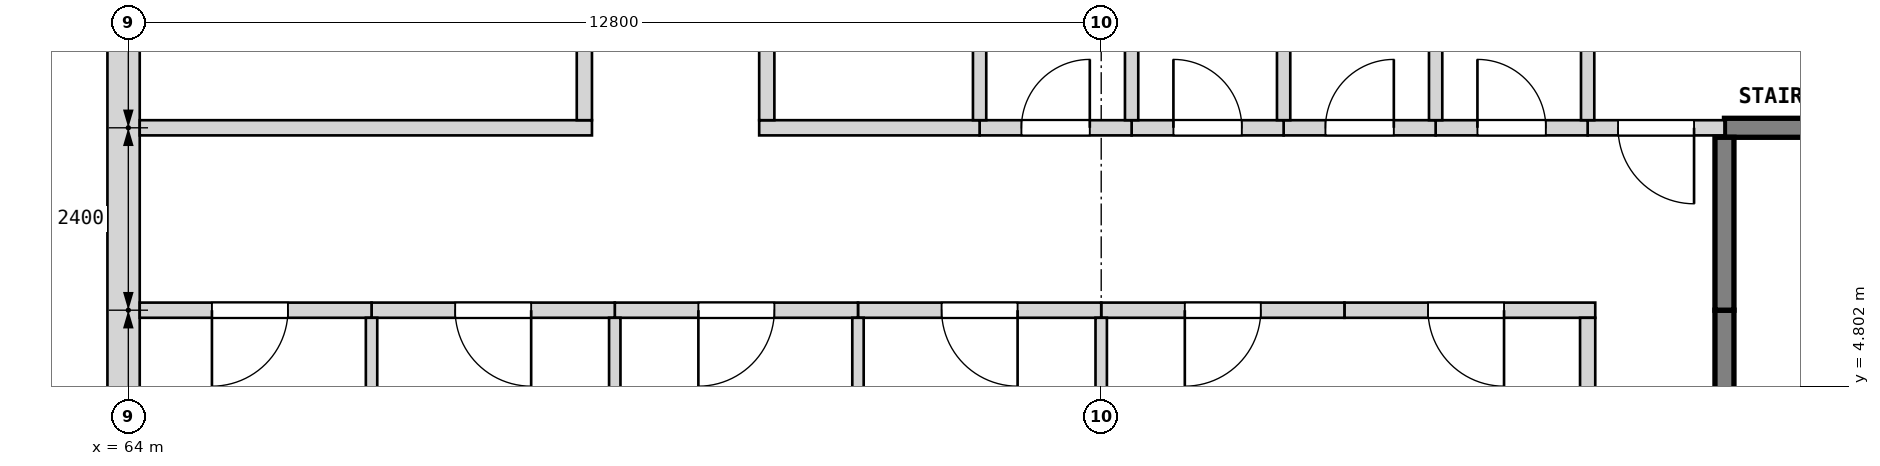
"""IFC4 building model, lengths in metres.
Left out: names, types, materials, properties, quantities, classifications, styles, units other than length and angle.
Written with IfcOpenShell. Run it as: python <this file> out.ifc"""

import sys

from ifc_helpers import new_model, si_unit, direction, frame, frame_2d, origin, place, context, subcontext, project, spatial, rectangle, extrude, element, fill, save


model = new_model("IFC4")
c1 = context("Model", 3, precision=1e-05, world=origin(), true_north=direction((0.0, 1.0)))
c2 = subcontext(c1, "Body", "Model", "MODEL_VIEW")
j1 = project(units=[si_unit("LENGTHUNIT", "METRE"), si_unit("PLANEANGLEUNIT", "RADIAN")], contexts=[c1])
p1 = place(None, origin())
s1 = spatial("IfcSite", under=j1, at=p1, CompositionType="ELEMENT")
p2 = place(p1, origin())
s2 = spatial("IfcBuilding", under=s1, at=p2, CompositionType="ELEMENT")
p3 = place(p2, frame((0.0, 0.0, 4.2)))
s3 = spatial("IfcBuildingStorey", under=s2, at=p3, CompositionType="ELEMENT", Elevation=4.2)
p4 = place(p3, frame((53.4, 4.8, 0.0), z_axis=(0.0, 0.0, 1.0), x_axis=(1.0, 0.0, 0.0)))
e1 = element("IfcWall", 1, at=p4, inside=s3, PredefinedType="SHEAR", context=c2, shape_type="SweptSolid", body=[
    extrude(rectangle(XDim=10.325, YDim=0.4, at=frame_2d((5.163, 0.0))), origin(), (0.0, 0.0, 1.0), 4.2),
])
p5 = place(p4, frame((1.65, 0.0, 1.1)))
e2 = element("IfcOpeningElement", 2, at=p5, cuts=e1, PredefinedType="OPENING", context=c2, shape_type="SweptSolid", body=[
    extrude(rectangle(XDim=1.2, YDim=1.5, at=frame_2d((0.6, 0.75))), frame((0.0, 0.21, 0.0), z_axis=(0.0, -1.0, 0.0), x_axis=(1.0, 0.0, 0.0)), (0.0, 0.0, 1.0), 0.42),
])
p6 = place(p4, frame((7.15, 0.0, 1.1)))
e3 = element("IfcOpeningElement", 3, at=p6, cuts=e1, PredefinedType="OPENING", context=c2, shape_type="SweptSolid", body=[
    extrude(rectangle(XDim=1.2, YDim=1.5, at=frame_2d((0.6, 0.75))), frame((0.0, 0.21, 0.0), z_axis=(0.0, -1.0, 0.0), x_axis=(1.0, 0.0, 0.0)), (0.0, 0.0, 1.0), 0.42),
])
p7 = place(p3, frame((63.2, 5.0, 0.0), z_axis=(0.0, 0.0, 1.0), x_axis=(0.0, 1.0, 0.0)))
e4 = element("IfcWall", 4, at=p7, inside=s3, PredefinedType="SHEAR", context=c2, shape_type="SweptSolid", body=[
    extrude(rectangle(XDim=9.2, YDim=0.4, at=frame_2d((4.6, 0.0))), origin(), (0.0, 0.0, 1.0), 4.2),
])
p8 = place(p3, frame((63.938, 0.3, 0.0), z_axis=(0.0, 0.0, 1.0), x_axis=(0.0, 1.0, 0.0)))
e5 = element("IfcWall", 5, at=p8, inside=s3, PredefinedType="SOLIDWALL", context=c2, shape_type="SweptSolid", body=[
    extrude(rectangle(XDim=13.8, YDim=0.425, at=frame_2d((6.9, 0.0))), origin(), (0.0, 0.0, 1.0), 2.9),
])
p9 = place(p8, frame((1.425, 0.0, 1.0)))
e6 = element("IfcOpeningElement", 6, at=p9, cuts=e5, PredefinedType="OPENING", context=c2, shape_type="SweptSolid", body=[
    extrude(rectangle(XDim=1.6, YDim=1.8, at=frame_2d((0.8, 0.9))), frame((0.0, 0.222, 0.0), z_axis=(0.0, -1.0, 0.0), x_axis=(1.0, 0.0, 0.0)), (0.0, 0.0, 1.0), 0.445),
])
p10 = place(p8, frame((10.025, 0.0, 1.0)))
e7 = element("IfcOpeningElement", 7, at=p10, cuts=e5, PredefinedType="OPENING", context=c2, shape_type="SweptSolid", body=[
    extrude(rectangle(XDim=1.6, YDim=1.8, at=frame_2d((0.8, 0.9))), frame((0.0, 0.222, 0.0), z_axis=(0.0, -1.0, 0.0), x_axis=(1.0, 0.0, 0.0)), (0.0, 0.0, 1.0), 0.445),
])
p11 = place(p3, frame((83.3, 5.8, 0.0), z_axis=(0.0, 0.0, 1.0), x_axis=(-1.0, 0.0, 0.0)))
e8 = element("IfcWall", 8, at=p11, inside=s3, PredefinedType="PARTITIONING", context=c2, shape_type="SweptSolid", body=[
    extrude(rectangle(XDim=3.3, YDim=0.2, at=frame_2d((1.65, 0.0))), origin(), (0.0, 0.0, 1.0), 3.9),
])
p12 = place(p11, frame((1.2, 0.0, 0.0)))
e9 = element("IfcOpeningElement", 9, at=p12, cuts=e8, PredefinedType="OPENING", context=c2, shape_type="SweptSolid", body=[
    extrude(rectangle(XDim=1.0, YDim=2.1, at=frame_2d((0.5, 1.05))), frame((0.0, 0.11, 0.0), z_axis=(0.0, -1.0, 0.0), x_axis=(1.0, 0.0, 0.0)), (0.0, 0.0, 1.0), 0.22),
])
p13 = place(p3, frame((80.0, 5.8, 0.0), z_axis=(0.0, 0.0, 1.0), x_axis=(-1.0, 0.0, 0.0)))
e10 = element("IfcWall", 10, at=p13, inside=s3, PredefinedType="PARTITIONING", context=c2, shape_type="SweptSolid", body=[
    extrude(rectangle(XDim=3.2, YDim=0.2, at=frame_2d((1.6, 0.0))), origin(), (0.0, 0.0, 1.0), 3.9),
])
p14 = place(p13, frame((1.1, 0.0, 0.0)))
e11 = element("IfcOpeningElement", 11, at=p14, cuts=e10, PredefinedType="OPENING", context=c2, shape_type="SweptSolid", body=[
    extrude(rectangle(XDim=1.0, YDim=2.1, at=frame_2d((0.5, 1.05))), frame((0.0, 0.11, 0.0), z_axis=(0.0, -1.0, 0.0), x_axis=(1.0, 0.0, 0.0)), (0.0, 0.0, 1.0), 0.22),
])
p15 = place(p3, frame((76.8, 5.8, 0.0), z_axis=(0.0, 0.0, 1.0), x_axis=(-1.0, 0.0, 0.0)))
e12 = element("IfcWall", 12, at=p15, inside=s3, PredefinedType="PARTITIONING", context=c2, shape_type="SweptSolid", body=[
    extrude(rectangle(XDim=3.2, YDim=0.2, at=frame_2d((1.6, 0.0))), origin(), (0.0, 0.0, 1.0), 3.9),
])
p16 = place(p15, frame((1.1, 0.0, 0.0)))
e13 = element("IfcOpeningElement", 13, at=p16, cuts=e12, PredefinedType="OPENING", context=c2, shape_type="SweptSolid", body=[
    extrude(rectangle(XDim=1.0, YDim=2.1, at=frame_2d((0.5, 1.05))), frame((0.0, 0.11, 0.0), z_axis=(0.0, -1.0, 0.0), x_axis=(1.0, 0.0, 0.0)), (0.0, 0.0, 1.0), 0.22),
])
p17 = place(p3, frame((73.6, 5.8, 0.0), z_axis=(0.0, 0.0, 1.0), x_axis=(-1.0, 0.0, 0.0)))
e14 = element("IfcWall", 14, at=p17, inside=s3, PredefinedType="PARTITIONING", context=c2, shape_type="SweptSolid", body=[
    extrude(rectangle(XDim=3.2, YDim=0.2, at=frame_2d((1.6, 0.0))), origin(), (0.0, 0.0, 1.0), 3.9),
])
p18 = place(p17, frame((1.1, 0.0, 0.0)))
e15 = element("IfcOpeningElement", 15, at=p18, cuts=e14, PredefinedType="OPENING", context=c2, shape_type="SweptSolid", body=[
    extrude(rectangle(XDim=1.0, YDim=2.1, at=frame_2d((0.5, 1.05))), frame((0.0, 0.11, 0.0), z_axis=(0.0, -1.0, 0.0), x_axis=(1.0, 0.0, 0.0)), (0.0, 0.0, 1.0), 0.22),
])
p19 = place(p3, frame((70.4, 5.8, 0.0), z_axis=(0.0, 0.0, 1.0), x_axis=(-1.0, 0.0, 0.0)))
e16 = element("IfcWall", 16, at=p19, inside=s3, PredefinedType="PARTITIONING", context=c2, shape_type="SweptSolid", body=[
    extrude(rectangle(XDim=3.2, YDim=0.2, at=frame_2d((1.6, 0.0))), origin(), (0.0, 0.0, 1.0), 3.9),
])
p20 = place(p19, frame((1.1, 0.0, 0.0)))
e17 = element("IfcOpeningElement", 17, at=p20, cuts=e16, PredefinedType="OPENING", context=c2, shape_type="SweptSolid", body=[
    extrude(rectangle(XDim=1.0, YDim=2.1, at=frame_2d((0.5, 1.05))), frame((0.0, 0.11, 0.0), z_axis=(0.0, -1.0, 0.0), x_axis=(1.0, 0.0, 0.0)), (0.0, 0.0, 1.0), 0.22),
])
p21 = place(p3, frame((67.2, 5.8, 0.0), z_axis=(0.0, 0.0, 1.0), x_axis=(-1.0, 0.0, 0.0)))
e18 = element("IfcWall", 18, at=p21, inside=s3, PredefinedType="PARTITIONING", context=c2, shape_type="SweptSolid", body=[
    extrude(rectangle(XDim=3.05, YDim=0.2, at=frame_2d((1.525, 0.0))), origin(), (0.0, 0.0, 1.0), 3.9),
])
p22 = place(p21, frame((1.1, 0.0, 0.0)))
e19 = element("IfcOpeningElement", 19, at=p22, cuts=e18, PredefinedType="OPENING", context=c2, shape_type="SweptSolid", body=[
    extrude(rectangle(XDim=1.0, YDim=2.1, at=frame_2d((0.5, 1.05))), frame((0.0, 0.11, 0.0), z_axis=(0.0, -1.0, 0.0), x_axis=(1.0, 0.0, 0.0)), (0.0, 0.0, 1.0), 0.22),
])
p23 = place(p3, frame((88.6, 8.2, 0.0), z_axis=(0.0, 0.0, 1.0), x_axis=(-1.0, 0.0, 0.0)))
e20 = element("IfcWall", 20, at=p23, inside=s3, PredefinedType="SHEAR", context=c2, shape_type="SweptSolid", body=[
    extrude(rectangle(XDim=3.6, YDim=0.25, at=frame_2d((1.8, 0.0))), origin(), (0.0, 0.0, 1.0), 3.9),
])
p24 = place(p3, frame((85.0, 8.2, 0.0), z_axis=(0.0, 0.0, 1.0), x_axis=(-1.0, 0.0, 0.0)))
e21 = element("IfcWall", 21, at=p24, inside=s3, PredefinedType="PARTITIONING", context=c2, shape_type="SweptSolid", body=[
    extrude(rectangle(XDim=1.8, YDim=0.2, at=frame_2d((0.9, 0.0))), origin(), (0.0, 0.0, 1.0), 3.9),
])
p25 = place(p24, frame((0.4, 0.0, 0.0)))
e22 = element("IfcOpeningElement", 22, at=p25, cuts=e21, PredefinedType="OPENING", context=c2, shape_type="SweptSolid", body=[
    extrude(rectangle(XDim=1.0, YDim=2.1, at=frame_2d((0.5, 1.05))), frame((0.0, 0.11, 0.0), z_axis=(0.0, -1.0, 0.0), x_axis=(1.0, 0.0, 0.0)), (0.0, 0.0, 1.0), 0.22),
])
p26 = place(p3, frame((83.2, 8.2, 0.0), z_axis=(0.0, 0.0, 1.0), x_axis=(-1.0, 0.0, 0.0)))
e23 = element("IfcWall", 23, at=p26, inside=s3, PredefinedType="PARTITIONING", context=c2, shape_type="SweptSolid", body=[
    extrude(rectangle(XDim=2.0, YDim=0.2, at=frame_2d((1.0, 0.0))), origin(), (0.0, 0.0, 1.0), 3.9),
])
p27 = place(p26, frame((0.55, 0.0, 0.0)))
e24 = element("IfcOpeningElement", 24, at=p27, cuts=e23, PredefinedType="OPENING", context=c2, shape_type="SweptSolid", body=[
    extrude(rectangle(XDim=0.9, YDim=2.1, at=frame_2d((0.45, 1.05))), frame((0.0, 0.11, 0.0), z_axis=(0.0, -1.0, 0.0), x_axis=(1.0, 0.0, 0.0)), (0.0, 0.0, 1.0), 0.22),
])
p28 = place(p3, frame((81.2, 8.2, 0.0), z_axis=(0.0, 0.0, 1.0), x_axis=(-1.0, 0.0, 0.0)))
e25 = element("IfcWall", 25, at=p28, inside=s3, PredefinedType="PARTITIONING", context=c2, shape_type="SweptSolid", body=[
    extrude(rectangle(XDim=2.0, YDim=0.2, at=frame_2d((1.0, 0.0))), origin(), (0.0, 0.0, 1.0), 3.9),
])
p29 = place(p28, frame((0.55, 0.0, 0.0)))
e26 = element("IfcOpeningElement", 26, at=p29, cuts=e25, PredefinedType="OPENING", context=c2, shape_type="SweptSolid", body=[
    extrude(rectangle(XDim=0.9, YDim=2.1, at=frame_2d((0.45, 1.05))), frame((0.0, 0.11, 0.0), z_axis=(0.0, -1.0, 0.0), x_axis=(1.0, 0.0, 0.0)), (0.0, 0.0, 1.0), 0.22),
])
p30 = place(p3, frame((79.2, 8.2, 0.0), z_axis=(0.0, 0.0, 1.0), x_axis=(-1.0, 0.0, 0.0)))
e27 = element("IfcWall", 27, at=p30, inside=s3, PredefinedType="PARTITIONING", context=c2, shape_type="SweptSolid", body=[
    extrude(rectangle(XDim=2.0, YDim=0.2, at=frame_2d((1.0, 0.0))), origin(), (0.0, 0.0, 1.0), 3.9),
])
p31 = place(p30, frame((0.55, 0.0, 0.0)))
e28 = element("IfcOpeningElement", 28, at=p31, cuts=e27, PredefinedType="OPENING", context=c2, shape_type="SweptSolid", body=[
    extrude(rectangle(XDim=0.9, YDim=2.1, at=frame_2d((0.45, 1.05))), frame((0.0, 0.11, 0.0), z_axis=(0.0, -1.0, 0.0), x_axis=(1.0, 0.0, 0.0)), (0.0, 0.0, 1.0), 0.22),
])
p32 = place(p3, frame((77.2, 8.2, 0.0), z_axis=(0.0, 0.0, 1.0), x_axis=(-1.0, 0.0, 0.0)))
e29 = element("IfcWall", 29, at=p32, inside=s3, PredefinedType="PARTITIONING", context=c2, shape_type="SweptSolid", body=[
    extrude(rectangle(XDim=2.0, YDim=0.2, at=frame_2d((1.0, 0.0))), origin(), (0.0, 0.0, 1.0), 3.9),
])
p33 = place(p32, frame((0.55, 0.0, 0.0)))
e30 = element("IfcOpeningElement", 30, at=p33, cuts=e29, PredefinedType="OPENING", context=c2, shape_type="SweptSolid", body=[
    extrude(rectangle(XDim=0.9, YDim=2.1, at=frame_2d((0.45, 1.05))), frame((0.0, 0.11, 0.0), z_axis=(0.0, -1.0, 0.0), x_axis=(1.0, 0.0, 0.0)), (0.0, 0.0, 1.0), 0.22),
])
p34 = place(p3, frame((75.2, 8.2, 0.0), z_axis=(0.0, 0.0, 1.0), x_axis=(-1.0, 0.0, 0.0)))
e31 = element("IfcWall", 31, at=p34, inside=s3, PredefinedType="PARTITIONING", context=c2, shape_type="SweptSolid", body=[
    extrude(rectangle(XDim=2.9, YDim=0.2, at=frame_2d((1.45, 0.0))), origin(), (0.0, 0.0, 1.0), 3.9),
])
p35 = place(p3, frame((70.1, 8.2, 0.0), z_axis=(0.0, 0.0, 1.0), x_axis=(-1.0, 0.0, 0.0)))
e32 = element("IfcWall", 32, at=p35, inside=s3, PredefinedType="PARTITIONING", context=c2, shape_type="SweptSolid", body=[
    extrude(rectangle(XDim=5.95, YDim=0.2, at=frame_2d((2.975, 0.0))), origin(), (0.0, 0.0, 1.0), 3.9),
])
p36 = place(p3, frame((85.0, 2.325, 0.0), z_axis=(0.0, 0.0, 1.0), x_axis=(0.0, 1.0, 0.0)))
e33 = element("IfcWall", 33, at=p36, inside=s3, PredefinedType="SHEAR", context=c2, shape_type="SweptSolid", body=[
    extrude(rectangle(XDim=3.475, YDim=0.25, at=frame_2d((1.738, 0.0))), origin(), (0.0, 0.0, 1.0), 3.9),
])
p37 = place(p3, frame((85.0, 5.8, 0.0), z_axis=(0.0, 0.0, 1.0), x_axis=(0.0, 1.0, 0.0)))
e34 = element("IfcWall", 34, at=p37, inside=s3, PredefinedType="SHEAR", context=c2, shape_type="SweptSolid", body=[
    extrude(rectangle(XDim=2.275, YDim=0.25, at=frame_2d((1.137, 0.0))), origin(), (0.0, 0.0, 1.0), 3.9),
])
p38 = place(p3, frame((83.2, 0.15, 0.0), z_axis=(0.0, 0.0, 1.0), x_axis=(0.0, 1.0, 0.0)))
e35 = element("IfcWall", 35, at=p38, inside=s3, PredefinedType="PARTITIONING", context=c2, shape_type="SweptSolid", body=[
    extrude(rectangle(XDim=5.55, YDim=0.2, at=frame_2d((2.775, 0.0))), origin(), (0.0, 0.0, 1.0), 2.9),
])
p39 = place(p3, frame((83.2, 8.3, 0.0), z_axis=(0.0, 0.0, 1.0), x_axis=(0.0, 1.0, 0.0)))
e36 = element("IfcWall", 36, at=p39, inside=s3, PredefinedType="PARTITIONING", context=c2, shape_type="SweptSolid", body=[
    extrude(rectangle(XDim=3.012, YDim=0.175, at=frame_2d((1.506, 0.0))), origin(), (0.0, 0.0, 1.0), 2.9),
])
for number, where, z_axis, x_axis in (
    (37, (81.2, 8.3, 0.0), (0.0, 0.0, 1.0), (0.0, 1.0, 0.0)),
    (38, (79.2, 8.3, 0.0), (0.0, 0.0, 1.0), (0.0, 1.0, 0.0)),
    (39, (77.2, 8.3, 0.0), (0.0, 0.0, 1.0), (0.0, 1.0, 0.0)),
):
    element("IfcWall", number, at=place(p3, frame(where, z_axis=z_axis, x_axis=x_axis)), inside=s3, PredefinedType="PARTITIONING", context=c2, shape_type="SweptSolid", body=[
        extrude(rectangle(XDim=3.012, YDim=0.175, at=frame_2d((1.506, 0.0))), origin(), (0.0, 0.0, 1.0), 3.9),
    ])
p40 = place(p3, frame((76.8, 0.27, 0.0), z_axis=(0.0, 0.0, 1.0), x_axis=(0.0, 1.0, 0.0)))
e40 = element("IfcWall", 40, at=p40, inside=s3, PredefinedType="PARTITIONING", context=c2, shape_type="SweptSolid", body=[
    extrude(rectangle(XDim=5.43, YDim=0.15, at=frame_2d((2.715, 0.0))), origin(), (0.0, 0.0, 1.0), 2.9),
])
p41 = place(p3, frame((75.2, 8.3, 0.0), z_axis=(0.0, 0.0, 1.0), x_axis=(0.0, 1.0, 0.0)))
e41 = element("IfcWall", 41, at=p41, inside=s3, PredefinedType="PARTITIONING", context=c2, shape_type="SweptSolid", body=[
    extrude(rectangle(XDim=3.012, YDim=0.175, at=frame_2d((1.506, 0.0))), origin(), (0.0, 0.0, 1.0), 3.9),
])
p42 = place(p3, frame((73.6, 0.15, 0.0), z_axis=(0.0, 0.0, 1.0), x_axis=(0.0, 1.0, 0.0)))
e42 = element("IfcWall", 42, at=p42, inside=s3, PredefinedType="PARTITIONING", context=c2, shape_type="SweptSolid", body=[
    extrude(rectangle(XDim=5.55, YDim=0.15, at=frame_2d((2.775, 0.0))), origin(), (0.0, 0.0, 1.0), 3.0),
])
p43 = place(p3, frame((72.4, 8.3, 0.0), z_axis=(0.0, 0.0, 1.0), x_axis=(0.0, 1.0, 0.0)))
e43 = element("IfcWall", 43, at=p43, inside=s3, PredefinedType="PARTITIONING", context=c2, shape_type="SweptSolid", body=[
    extrude(rectangle(XDim=10.625, YDim=0.2, at=frame_2d((5.312, 0.0))), origin(), (0.0, 0.0, 1.0), 3.9),
])
p44 = place(p43, frame((4.8, 0.0, 0.0)))
e44 = element("IfcOpeningElement", 44, at=p44, cuts=e43, PredefinedType="OPENING", context=c2, shape_type="SweptSolid", body=[
    extrude(rectangle(XDim=1.0, YDim=2.1, at=frame_2d((0.5, 1.05))), frame((0.0, 0.11, 0.0), z_axis=(0.0, -1.0, 0.0), x_axis=(1.0, 0.0, 0.0)), (0.0, 0.0, 1.0), 0.22),
])
p45 = place(p3, frame((70.4, 0.15, 0.0), z_axis=(0.0, 0.0, 1.0), x_axis=(0.0, 1.0, 0.0)))
e45 = element("IfcWall", 45, at=p45, inside=s3, PredefinedType="PARTITIONING", context=c2, shape_type="SweptSolid", body=[
    extrude(rectangle(XDim=5.55, YDim=0.15, at=frame_2d((2.775, 0.0))), origin(), (0.0, 0.0, 1.0), 2.9),
])
p46 = place(p3, frame((70.0, 8.3, 0.0), z_axis=(0.0, 0.0, 1.0), x_axis=(0.0, 1.0, 0.0)))
e46 = element("IfcWall", 46, at=p46, inside=s3, PredefinedType="PARTITIONING", context=c2, shape_type="SweptSolid", body=[
    extrude(rectangle(XDim=6.025, YDim=0.2, at=frame_2d((3.012, 0.0))), origin(), (0.0, 0.0, 1.0), 3.9),
])
p47 = place(p46, frame((2.5, 0.0, 0.0)))
e47 = element("IfcOpeningElement", 47, at=p47, cuts=e46, PredefinedType="OPENING", context=c2, shape_type="SweptSolid", body=[
    extrude(rectangle(XDim=1.0, YDim=2.1, at=frame_2d((0.5, 1.05))), frame((0.0, 0.11, 0.0), z_axis=(0.0, -1.0, 0.0), x_axis=(1.0, 0.0, 0.0)), (0.0, 0.0, 1.0), 0.22),
])
p48 = place(p3, frame((67.2, 0.15, 0.0), z_axis=(0.0, 0.0, 1.0), x_axis=(0.0, 1.0, 0.0)))
e48 = element("IfcWall", 48, at=p48, inside=s3, PredefinedType="PARTITIONING", context=c2, shape_type="SweptSolid", body=[
    extrude(rectangle(XDim=5.55, YDim=0.15, at=frame_2d((2.775, 0.0))), origin(), (0.0, 0.0, 1.0), 3.0),
])
p49 = place(p12, origin())
e49 = element("IfcDoor", 49, at=p49, inside=s3, OperationType="SINGLE_SWING_LEFT", PredefinedType="DOOR", context=c2, shape_type="SweptSolid", body=[
    extrude(rectangle(XDim=1.0, YDim=2.1, at=frame_2d((0.5, 1.05))), frame((0.0, 0.025, 0.0), z_axis=(0.0, -1.0, 0.0), x_axis=(1.0, 0.0, 0.0)), (0.0, 0.0, 1.0), 0.05),
])
fill(e9, e49)
p50 = place(p14, origin())
e50 = element("IfcDoor", 50, at=p50, inside=s3, OperationType="SINGLE_SWING_RIGHT", PredefinedType="DOOR", context=c2, shape_type="SweptSolid", body=[
    extrude(rectangle(XDim=1.0, YDim=2.1, at=frame_2d((0.5, 1.05))), frame((0.0, 0.025, 0.0), z_axis=(0.0, -1.0, 0.0), x_axis=(1.0, 0.0, 0.0)), (0.0, 0.0, 1.0), 0.05),
])
fill(e11, e50)
p51 = place(p16, origin())
e51 = element("IfcDoor", 51, at=p51, inside=s3, OperationType="SINGLE_SWING_LEFT", PredefinedType="DOOR", context=c2, shape_type="SweptSolid", body=[
    extrude(rectangle(XDim=1.0, YDim=2.1, at=frame_2d((0.5, 1.05))), frame((0.0, 0.025, 0.0), z_axis=(0.0, -1.0, 0.0), x_axis=(1.0, 0.0, 0.0)), (0.0, 0.0, 1.0), 0.05),
])
fill(e13, e51)
p52 = place(p18, origin())
e52 = element("IfcDoor", 52, at=p52, inside=s3, OperationType="SINGLE_SWING_RIGHT", PredefinedType="DOOR", context=c2, shape_type="SweptSolid", body=[
    extrude(rectangle(XDim=1.0, YDim=2.1, at=frame_2d((0.5, 1.05))), frame((0.0, 0.025, 0.0), z_axis=(0.0, -1.0, 0.0), x_axis=(1.0, 0.0, 0.0)), (0.0, 0.0, 1.0), 0.05),
])
fill(e15, e52)
p53 = place(p20, origin())
e53 = element("IfcDoor", 53, at=p53, inside=s3, OperationType="SINGLE_SWING_LEFT", PredefinedType="DOOR", context=c2, shape_type="SweptSolid", body=[
    extrude(rectangle(XDim=1.0, YDim=2.1, at=frame_2d((0.5, 1.05))), frame((0.0, 0.025, 0.0), z_axis=(0.0, -1.0, 0.0), x_axis=(1.0, 0.0, 0.0)), (0.0, 0.0, 1.0), 0.05),
])
fill(e17, e53)
p54 = place(p22, origin())
e54 = element("IfcDoor", 54, at=p54, inside=s3, OperationType="SINGLE_SWING_RIGHT", PredefinedType="DOOR", context=c2, shape_type="SweptSolid", body=[
    extrude(rectangle(XDim=1.0, YDim=2.1, at=frame_2d((0.5, 1.05))), frame((0.0, 0.025, 0.0), z_axis=(0.0, -1.0, 0.0), x_axis=(1.0, 0.0, 0.0)), (0.0, 0.0, 1.0), 0.05),
])
fill(e19, e54)
p55 = place(p27, frame((0.9, 0.0, 0.0), z_axis=(0.0, 0.0, 1.0), x_axis=(-1.0, 0.0, 0.0)))
e55 = element("IfcDoor", 55, at=p55, inside=s3, OperationType="SINGLE_SWING_LEFT", PredefinedType="DOOR", context=c2, shape_type="SweptSolid", body=[
    extrude(rectangle(XDim=0.9, YDim=2.1, at=frame_2d((0.45, 1.05))), frame((0.0, 0.025, 0.0), z_axis=(0.0, -1.0, 0.0), x_axis=(1.0, 0.0, 0.0)), (0.0, 0.0, 1.0), 0.05),
])
fill(e24, e55)
p56 = place(p29, frame((0.9, 0.0, 0.0), z_axis=(0.0, 0.0, 1.0), x_axis=(-1.0, 0.0, 0.0)))
e56 = element("IfcDoor", 56, at=p56, inside=s3, OperationType="SINGLE_SWING_RIGHT", PredefinedType="DOOR", context=c2, shape_type="SweptSolid", body=[
    extrude(rectangle(XDim=0.9, YDim=2.1, at=frame_2d((0.45, 1.05))), frame((0.0, 0.025, 0.0), z_axis=(0.0, -1.0, 0.0), x_axis=(1.0, 0.0, 0.0)), (0.0, 0.0, 1.0), 0.05),
])
fill(e26, e56)
p57 = place(p31, frame((0.9, 0.0, 0.0), z_axis=(0.0, 0.0, 1.0), x_axis=(-1.0, 0.0, 0.0)))
e57 = element("IfcDoor", 57, at=p57, inside=s3, OperationType="SINGLE_SWING_LEFT", PredefinedType="DOOR", context=c2, shape_type="SweptSolid", body=[
    extrude(rectangle(XDim=0.9, YDim=2.1, at=frame_2d((0.45, 1.05))), frame((0.0, 0.025, 0.0), z_axis=(0.0, -1.0, 0.0), x_axis=(1.0, 0.0, 0.0)), (0.0, 0.0, 1.0), 0.05),
])
fill(e28, e57)
p58 = place(p33, frame((0.9, 0.0, 0.0), z_axis=(0.0, 0.0, 1.0), x_axis=(-1.0, 0.0, 0.0)))
e58 = element("IfcDoor", 58, at=p58, inside=s3, OperationType="SINGLE_SWING_RIGHT", PredefinedType="DOOR", context=c2, shape_type="SweptSolid", body=[
    extrude(rectangle(XDim=0.9, YDim=2.1, at=frame_2d((0.45, 1.05))), frame((0.0, 0.025, 0.0), z_axis=(0.0, -1.0, 0.0), x_axis=(1.0, 0.0, 0.0)), (0.0, 0.0, 1.0), 0.05),
])
fill(e30, e58)
p59 = place(p25, origin())
e59 = element("IfcDoor", 59, at=p59, inside=s3, OperationType="SINGLE_SWING_LEFT", PredefinedType="DOOR", context=c2, shape_type="SweptSolid", body=[
    extrude(rectangle(XDim=1.0, YDim=2.1, at=frame_2d((0.5, 1.05))), frame((0.0, 0.025, 0.0), z_axis=(0.0, -1.0, 0.0), x_axis=(1.0, 0.0, 0.0)), (0.0, 0.0, 1.0), 0.05),
])
fill(e22, e59)
save(model, sys.argv[1])
